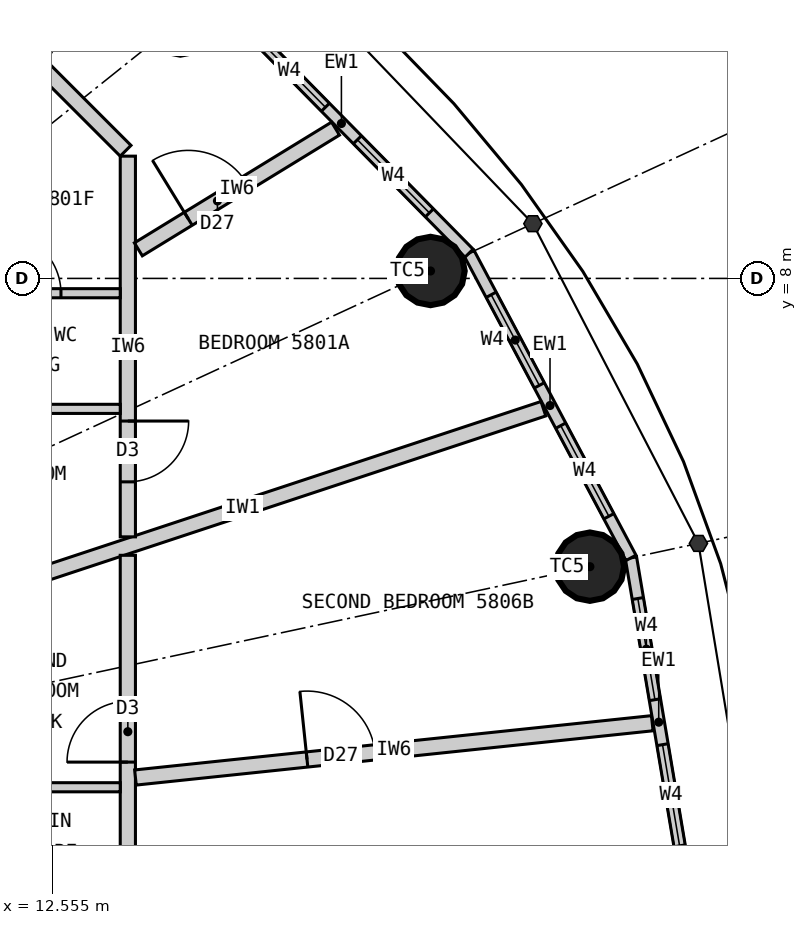
"""IFC4 building model, lengths in metres.
Left out: names, types, materials, properties, quantities, classifications, styles, units other than length and angle.
Written with IfcOpenShell. Run it as: python <this file> out.ifc"""

import sys

from ifc_helpers import new_model, si_unit, direction, frame, frame_2d, origin, origin_2d, place, context, subcontext, project, spatial, rectangle, circle, extrude, element, fill, save


model = new_model("IFC4")
c1 = context("Model", 3, precision=1e-05, world=origin(), true_north=direction((0.0, 1.0)))
c2 = subcontext(c1, "Body", "Model", "MODEL_VIEW")
j1 = project(units=[si_unit("LENGTHUNIT", "METRE"), si_unit("PLANEANGLEUNIT", "RADIAN")], contexts=[c1])
p1 = place(None, origin())
s1 = spatial("IfcSite", under=j1, at=p1, CompositionType="ELEMENT")
p2 = place(p1, origin())
s2 = spatial("IfcBuilding", under=s1, at=p2, CompositionType="ELEMENT")
p3 = place(p2, frame((0.0, 0.0, 216.0)))
s3 = spatial("IfcBuildingStorey", under=s2, at=p3, CompositionType="ELEMENT", Elevation=216.0)
for number, where, z_axis, x_axis in (
    (1, (19.629, 4.208, 0.0), (0.0, 0.0, 1.0), (1.0, 0.0, 0.0)),
    (2, (17.532, 8.098, 0.0), (0.0, 0.0, 1.0), (1.0, 0.0, 0.0)),
    (3, (14.241, 11.393, 0.0), (0.0, 0.0, 1.0), (1.0, 0.0, 0.0)),
):
    element("IfcColumn", number, at=place(p3, frame(where, z_axis=z_axis, x_axis=x_axis)), inside=s3, PredefinedType="COLUMN", context=c2, shape_type="SweptSolid", body=[
        extrude(circle(Radius=0.45, at=origin_2d()), origin(), (0.0, 0.0, 1.0), 3.3),
    ])
p4 = place(p3, frame((20.9, 0.0, 0.0), z_axis=(0.0, 0.0, 1.0), x_axis=(-0.166538513568, 0.986034950445, 0.0)))
e4 = element("IfcWall", 4, at=p4, inside=s3, PredefinedType="ELEMENTEDWALL", context=c2, shape_type="SweptSolid", body=[
    extrude(rectangle(XDim=4.385, YDim=0.15, at=frame_2d((2.192, 0.0))), origin(), (0.0, 0.0, 1.0), 3.12),
])
p5 = place(p4, frame((0.542, 0.0, 0.9)))
e5 = element("IfcOpeningElement", 5, at=p5, cuts=e4, PredefinedType="OPENING", context=c2, shape_type="SweptSolid", body=[
    extrude(rectangle(XDim=1.35, YDim=1.9, at=frame_2d((0.675, 0.95))), frame((0.0, 0.085, 0.0), z_axis=(0.0, -1.0, 0.0), x_axis=(1.0, 0.0, 0.0)), (0.0, 0.0, 1.0), 0.17),
])
p6 = place(p4, frame((2.492, 0.0, 0.9)))
e6 = element("IfcOpeningElement", 6, at=p6, cuts=e4, PredefinedType="OPENING", context=c2, shape_type="SweptSolid", body=[
    extrude(rectangle(XDim=1.35, YDim=1.9, at=frame_2d((0.675, 0.95))), frame((0.0, 0.085, 0.0), z_axis=(0.0, -1.0, 0.0), x_axis=(1.0, 0.0, 0.0)), (0.0, 0.0, 1.0), 0.17),
])
p7 = place(p3, frame((20.17, 4.323, 0.0), z_axis=(0.0, 0.0, 1.0), x_axis=(-0.469256152955, 0.883062094597, 0.0)))
e7 = element("IfcWall", 7, at=p7, inside=s3, PredefinedType="ELEMENTEDWALL", context=c2, shape_type="SweptSolid", body=[
    extrude(rectangle(XDim=4.539, YDim=0.15, at=frame_2d((2.27, 0.0))), origin(), (0.0, 0.0, 1.0), 3.12),
])
p8 = place(p7, frame((0.62, 0.0, 0.9)))
e8 = element("IfcOpeningElement", 8, at=p8, cuts=e7, PredefinedType="OPENING", context=c2, shape_type="SweptSolid", body=[
    extrude(rectangle(XDim=1.35, YDim=1.9, at=frame_2d((0.675, 0.95))), frame((0.0, 0.085, 0.0), z_axis=(0.0, -1.0, 0.0), x_axis=(1.0, 0.0, 0.0)), (0.0, 0.0, 1.0), 0.17),
])
p9 = place(p7, frame((2.57, 0.0, 0.9)))
e9 = element("IfcOpeningElement", 9, at=p9, cuts=e7, PredefinedType="OPENING", context=c2, shape_type="SweptSolid", body=[
    extrude(rectangle(XDim=1.35, YDim=1.9, at=frame_2d((0.675, 0.95))), frame((0.0, 0.085, 0.0), z_axis=(0.0, -1.0, 0.0), x_axis=(1.0, 0.0, 0.0)), (0.0, 0.0, 1.0), 0.17),
])
p10 = place(p3, frame((18.04, 8.332, 0.0), z_axis=(0.0, 0.0, 1.0), x_axis=(-0.701527379618, 0.712642501993, 0.0)))
e10 = element("IfcWall", 10, at=p10, inside=s3, PredefinedType="ELEMENTEDWALL", context=c2, shape_type="SweptSolid", body=[
    extrude(rectangle(XDim=4.788, YDim=0.15, at=frame_2d((2.394, 0.0))), origin(), (0.0, 0.0, 1.0), 3.12),
])
p11 = place(p10, frame((0.744, 0.0, 0.9)))
e11 = element("IfcOpeningElement", 11, at=p11, cuts=e10, PredefinedType="OPENING", context=c2, shape_type="SweptSolid", body=[
    extrude(rectangle(XDim=1.35, YDim=1.9, at=frame_2d((0.675, 0.95))), frame((0.0, 0.085, 0.0), z_axis=(0.0, -1.0, 0.0), x_axis=(1.0, 0.0, 0.0)), (0.0, 0.0, 1.0), 0.17),
])
p12 = place(p10, frame((2.694, 0.0, 0.9)))
e12 = element("IfcOpeningElement", 12, at=p12, cuts=e10, PredefinedType="OPENING", context=c2, shape_type="SweptSolid", body=[
    extrude(rectangle(XDim=1.35, YDim=1.9, at=frame_2d((0.675, 0.95))), frame((0.0, 0.085, 0.0), z_axis=(0.0, -1.0, 0.0), x_axis=(1.0, 0.0, 0.0)), (0.0, 0.0, 1.0), 0.17),
])
p13 = place(p3, frame((11.1, 3.669, 0.0), z_axis=(0.0, 0.0, 1.0), x_axis=(0.949476668397, 0.313837627079, 0.0)))
e13 = element("IfcWall", 13, at=p13, inside=s3, PredefinedType="PARTITIONING", context=c2, shape_type="SweptSolid", body=[
    extrude(rectangle(XDim=8.339, YDim=0.2, at=frame_2d((4.169, 0.0))), origin(), (0.0, 0.0, 1.0), 3.12),
])
p14 = place(p3, frame((13.55, 4.6, 0.0), z_axis=(0.0, 0.0, 1.0), x_axis=(0.0, 1.0, 0.0)))
e14 = element("IfcWall", 14, at=p14, inside=s3, PredefinedType="PARTITIONING", context=c2, shape_type="SweptSolid", body=[
    extrude(rectangle(XDim=5.009, YDim=0.2, at=frame_2d((2.504, 0.0))), origin(), (0.0, 0.0, 1.0), 3.12),
])
p15 = place(p14, frame((0.724, 0.0, 0.0)))
e15 = element("IfcOpeningElement", 15, at=p15, cuts=e14, PredefinedType="OPENING", context=c2, shape_type="SweptSolid", body=[
    extrude(rectangle(XDim=0.8, YDim=2.1, at=frame_2d((0.4, 1.05))), frame((0.0, 0.11, 0.0), z_axis=(0.0, -1.0, 0.0), x_axis=(1.0, 0.0, 0.0)), (0.0, 0.0, 1.0), 0.22),
])
p16 = place(p3, frame((13.521, 9.679, 0.0), z_axis=(0.0, 0.0, 1.0), x_axis=(-0.707106781187, 0.707106781187, 0.0)))
e16 = element("IfcWall", 16, at=p16, inside=s3, PredefinedType="PARTITIONING", context=c2, shape_type="SweptSolid", body=[
    extrude(rectangle(XDim=4.019, YDim=0.2, at=frame_2d((2.009, 0.0))), origin(), (0.0, 0.0, 1.0), 3.12),
])
p17 = place(p16, frame((1.57, 0.0, 0.0)))
e17 = element("IfcOpeningElement", 17, at=p17, cuts=e16, PredefinedType="OPENING", context=c2, shape_type="SweptSolid", body=[
    extrude(rectangle(XDim=0.9, YDim=2.1, at=frame_2d((0.45, 1.05))), frame((0.0, 0.11, 0.0), z_axis=(0.0, -1.0, 0.0), x_axis=(1.0, 0.0, 0.0)), (0.0, 0.0, 1.0), 0.22),
])
p18 = place(p3, frame((13.688, 8.382, 0.0), z_axis=(0.0, 0.0, 1.0), x_axis=(0.852783459586, 0.522264656144, 0.0)))
e18 = element("IfcWall", 18, at=p18, inside=s3, PredefinedType="PARTITIONING", context=c2, shape_type="SweptSolid", body=[
    extrude(rectangle(XDim=3.042, YDim=0.2, at=frame_2d((1.521, 0.0))), origin(), (0.0, 0.0, 1.0), 3.12),
])
p19 = place(p18, frame((0.77, 0.0, 0.0)))
e19 = element("IfcOpeningElement", 19, at=p19, cuts=e18, PredefinedType="OPENING", context=c2, shape_type="SweptSolid", body=[
    extrude(rectangle(XDim=0.9, YDim=2.1, at=frame_2d((0.45, 1.05))), frame((0.0, 0.11, 0.0), z_axis=(0.0, -1.0, 0.0), x_axis=(1.0, 0.0, 0.0)), (0.0, 0.0, 1.0), 0.22),
])
p20 = place(p3, frame((11.1, 6.284, 0.0), z_axis=(0.0, 0.0, 1.0), x_axis=(1.0, 0.0, 0.0)))
e20 = element("IfcWall", 20, at=p20, inside=s3, PredefinedType="PARTITIONING", context=c2, shape_type="SweptSolid", body=[
    extrude(rectangle(XDim=2.35, YDim=0.12, at=frame_2d((1.175, 0.0))), origin(), (0.0, 0.0, 1.0), 3.12),
])
p21 = place(p3, frame((11.1, 7.805, 0.0), z_axis=(0.0, 0.0, 1.0), x_axis=(1.0, 0.0, 0.0)))
e21 = element("IfcWall", 21, at=p21, inside=s3, PredefinedType="PARTITIONING", context=c2, shape_type="SweptSolid", body=[
    extrude(rectangle(XDim=2.35, YDim=0.12, at=frame_2d((1.175, 0.0))), origin(), (0.0, 0.0, 1.0), 3.12),
])
p22 = place(p21, frame((0.77, 0.0, 0.0)))
e22 = element("IfcOpeningElement", 22, at=p22, cuts=e21, PredefinedType="OPENING", context=c2, shape_type="SweptSolid", body=[
    extrude(rectangle(XDim=0.8, YDim=2.1, at=frame_2d((0.4, 1.05))), frame((0.0, 0.07, 0.0), z_axis=(0.0, -1.0, 0.0), x_axis=(1.0, 0.0, 0.0)), (0.0, 0.0, 1.0), 0.14),
])
p23 = place(p3, frame((13.55, -8.139, 0.0), z_axis=(0.0, 0.0, 1.0), x_axis=(0.0, 1.0, 0.0)))
e23 = element("IfcWall", 23, at=p23, inside=s3, PredefinedType="PARTITIONING", context=c2, shape_type="SweptSolid", body=[
    extrude(rectangle(XDim=12.496, YDim=0.2, at=frame_2d((6.248, 0.0))), origin(), (0.0, 0.0, 1.0), 3.12),
])
p24 = place(p23, frame((2.42, 0.0, 0.0)))
e24 = element("IfcOpeningElement", 24, at=p24, cuts=e23, PredefinedType="OPENING", context=c2, shape_type="SweptSolid", body=[
    extrude(rectangle(XDim=0.8, YDim=2.1, at=frame_2d((0.4, 1.05))), frame((0.0, 0.11, 0.0), z_axis=(0.0, -1.0, 0.0), x_axis=(1.0, 0.0, 0.0)), (0.0, 0.0, 1.0), 0.22),
])
p25 = place(p23, frame((9.776, 0.0, 0.0)))
e25 = element("IfcOpeningElement", 25, at=p25, cuts=e23, PredefinedType="OPENING", context=c2, shape_type="SweptSolid", body=[
    extrude(rectangle(XDim=0.8, YDim=2.1, at=frame_2d((0.4, 1.05))), frame((0.0, 0.11, 0.0), z_axis=(0.0, -1.0, 0.0), x_axis=(1.0, 0.0, 0.0)), (0.0, 0.0, 1.0), 0.22),
])
p26 = place(p23, frame((5.82, 0.0, 0.0)))
e26 = element("IfcOpeningElement", 26, at=p26, cuts=e23, PredefinedType="OPENING", context=c2, shape_type="SweptSolid", body=[
    extrude(rectangle(XDim=0.9, YDim=2.1, at=frame_2d((0.45, 1.05))), frame((0.0, 0.11, 0.0), z_axis=(0.0, -1.0, 0.0), x_axis=(1.0, 0.0, 0.0)), (0.0, 0.0, 1.0), 0.22),
])
p27 = place(p3, frame((13.65, 1.434, 0.0), z_axis=(0.0, 0.0, 1.0), x_axis=(0.994526954268, 0.10448031984, 0.0)))
e27 = element("IfcWall", 27, at=p27, inside=s3, PredefinedType="PARTITIONING", context=c2, shape_type="SweptSolid", body=[
    extrude(rectangle(XDim=6.837, YDim=0.2, at=frame_2d((3.418, 0.0))), origin(), (0.0, 0.0, 1.0), 2.47),
])
p28 = place(p27, frame((2.27, 0.0, 0.0)))
e28 = element("IfcOpeningElement", 28, at=p28, cuts=e27, PredefinedType="OPENING", context=c2, shape_type="SweptSolid", body=[
    extrude(rectangle(XDim=0.9, YDim=2.1, at=frame_2d((0.45, 1.05))), frame((0.0, 0.11, 0.0), z_axis=(0.0, -1.0, 0.0), x_axis=(1.0, 0.0, 0.0)), (0.0, 0.0, 1.0), 0.22),
])
p29 = place(p3, frame((11.1, 1.306, 0.0), z_axis=(0.0, 0.0, 1.0), x_axis=(1.0, 0.0, 0.0)))
e29 = element("IfcWall", 29, at=p29, inside=s3, PredefinedType="PARTITIONING", context=c2, shape_type="SweptSolid", body=[
    extrude(rectangle(XDim=2.35, YDim=0.12, at=frame_2d((1.175, 0.0))), origin(), (0.0, 0.0, 1.0), 3.12),
])
p30 = place(p5, origin())
e30 = element("IfcWindow", 30, at=p30, inside=s3, PartitioningType="SINGLE_PANEL", PredefinedType="WINDOW", context=c2, shape_type="SweptSolid", body=[
    extrude(rectangle(XDim=1.35, YDim=1.9, at=frame_2d((0.675, 0.95))), frame((0.0, 0.03, 0.0), z_axis=(0.0, -1.0, 0.0), x_axis=(1.0, 0.0, 0.0)), (0.0, 0.0, 1.0), 0.06),
])
fill(e5, e30)
p31 = place(p6, origin())
e31 = element("IfcWindow", 31, at=p31, inside=s3, PartitioningType="SINGLE_PANEL", PredefinedType="WINDOW", context=c2, shape_type="SweptSolid", body=[
    extrude(rectangle(XDim=1.35, YDim=1.9, at=frame_2d((0.675, 0.95))), frame((0.0, 0.03, 0.0), z_axis=(0.0, -1.0, 0.0), x_axis=(1.0, 0.0, 0.0)), (0.0, 0.0, 1.0), 0.06),
])
fill(e6, e31)
p32 = place(p8, origin())
e32 = element("IfcWindow", 32, at=p32, inside=s3, PartitioningType="SINGLE_PANEL", PredefinedType="WINDOW", context=c2, shape_type="SweptSolid", body=[
    extrude(rectangle(XDim=1.35, YDim=1.9, at=frame_2d((0.675, 0.95))), frame((0.0, 0.03, 0.0), z_axis=(0.0, -1.0, 0.0), x_axis=(1.0, 0.0, 0.0)), (0.0, 0.0, 1.0), 0.06),
])
fill(e8, e32)
p33 = place(p9, origin())
e33 = element("IfcWindow", 33, at=p33, inside=s3, PartitioningType="SINGLE_PANEL", PredefinedType="WINDOW", context=c2, shape_type="SweptSolid", body=[
    extrude(rectangle(XDim=1.35, YDim=1.9, at=frame_2d((0.675, 0.95))), frame((0.0, 0.03, 0.0), z_axis=(0.0, -1.0, 0.0), x_axis=(1.0, 0.0, 0.0)), (0.0, 0.0, 1.0), 0.06),
])
fill(e9, e33)
p34 = place(p11, origin())
e34 = element("IfcWindow", 34, at=p34, inside=s3, PartitioningType="SINGLE_PANEL", PredefinedType="WINDOW", context=c2, shape_type="SweptSolid", body=[
    extrude(rectangle(XDim=1.35, YDim=1.9, at=frame_2d((0.675, 0.95))), frame((0.0, 0.03, 0.0), z_axis=(0.0, -1.0, 0.0), x_axis=(1.0, 0.0, 0.0)), (0.0, 0.0, 1.0), 0.06),
])
fill(e11, e34)
p35 = place(p12, origin())
e35 = element("IfcWindow", 35, at=p35, inside=s3, PartitioningType="SINGLE_PANEL", PredefinedType="WINDOW", context=c2, shape_type="SweptSolid", body=[
    extrude(rectangle(XDim=1.35, YDim=1.9, at=frame_2d((0.675, 0.95))), frame((0.0, 0.03, 0.0), z_axis=(0.0, -1.0, 0.0), x_axis=(1.0, 0.0, 0.0)), (0.0, 0.0, 1.0), 0.06),
])
fill(e12, e35)
p36 = place(p15, origin())
e36 = element("IfcDoor", 36, at=p36, inside=s3, OperationType="SINGLE_SWING_RIGHT", PredefinedType="DOOR", context=c2, shape_type="SweptSolid", body=[
    extrude(rectangle(XDim=0.8, YDim=2.1, at=frame_2d((0.4, 1.05))), frame((0.0, 0.025, 0.0), z_axis=(0.0, -1.0, 0.0), x_axis=(1.0, 0.0, 0.0)), (0.0, 0.0, 1.0), 0.05),
])
fill(e15, e36)
p37 = place(p22, origin())
e37 = element("IfcDoor", 37, at=p37, inside=s3, OperationType="SINGLE_SWING_LEFT", PredefinedType="DOOR", context=c2, shape_type="SweptSolid", body=[
    extrude(rectangle(XDim=0.8, YDim=2.1, at=frame_2d((0.4, 1.05))), frame((0.0, 0.025, 0.0), z_axis=(0.0, -1.0, 0.0), x_axis=(1.0, 0.0, 0.0)), (0.0, 0.0, 1.0), 0.05),
])
fill(e22, e37)
p38 = place(p19, origin())
e38 = element("IfcDoor", 38, at=p38, inside=s3, OperationType="SINGLE_SWING_LEFT", PredefinedType="DOOR", context=c2, shape_type="SweptSolid", body=[
    extrude(rectangle(XDim=0.9, YDim=2.1, at=frame_2d((0.45, 1.05))), frame((0.0, 0.025, 0.0), z_axis=(0.0, -1.0, 0.0), x_axis=(1.0, 0.0, 0.0)), (0.0, 0.0, 1.0), 0.05),
])
fill(e19, e38)
p39 = place(p25, origin())
e39 = element("IfcDoor", 39, at=p39, inside=s3, OperationType="SINGLE_SWING_LEFT", PredefinedType="DOOR", context=c2, shape_type="SweptSolid", body=[
    extrude(rectangle(XDim=0.8, YDim=2.1, at=frame_2d((0.4, 1.05))), frame((0.0, 0.025, 0.0), z_axis=(0.0, -1.0, 0.0), x_axis=(1.0, 0.0, 0.0)), (0.0, 0.0, 1.0), 0.05),
])
fill(e25, e39)
p40 = place(p28, origin())
e40 = element("IfcDoor", 40, at=p40, inside=s3, OperationType="SINGLE_SWING_LEFT", PredefinedType="DOOR", context=c2, shape_type="SweptSolid", body=[
    extrude(rectangle(XDim=0.9, YDim=2.1, at=frame_2d((0.45, 1.05))), frame((0.0, 0.025, 0.0), z_axis=(0.0, -1.0, 0.0), x_axis=(1.0, 0.0, 0.0)), (0.0, 0.0, 1.0), 0.05),
])
fill(e28, e40)
save(model, sys.argv[1])
